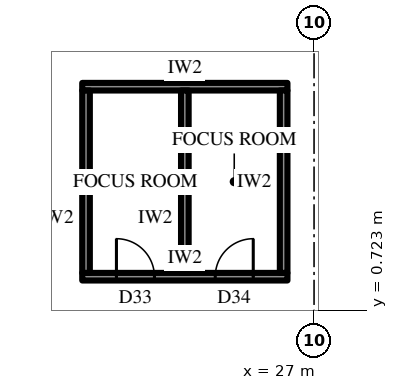
"""IFC4 building model, lengths in metres.
Left out: names, types, materials, properties, quantities, classifications, styles, units other than length and angle.
Written with IfcOpenShell. Run it as: python <this file> out.ifc"""

import sys

from ifc_helpers import new_model, si_unit, direction, frame, frame_2d, origin, place, context, subcontext, project, spatial, rectangle, extrude, element, fill, save


model = new_model("IFC4")
c1 = context("Model", 3, precision=1e-05, world=origin(), true_north=direction((0.0, 1.0)))
c2 = subcontext(c1, "Body", "Model", "MODEL_VIEW")
j1 = project(units=[si_unit("LENGTHUNIT", "METRE"), si_unit("PLANEANGLEUNIT", "RADIAN")], contexts=[c1])
p1 = place(None, origin())
s1 = spatial("IfcSite", under=j1, at=p1, CompositionType="ELEMENT")
p2 = place(p1, origin())
s2 = spatial("IfcBuilding", under=s1, at=p2, CompositionType="ELEMENT")
p3 = place(p2, frame((0.0, 0.0, 153.1)))
s3 = spatial("IfcBuildingStorey", under=s2, at=p3, CompositionType="ELEMENT", Elevation=153.1)
p4 = place(p3, frame((20.9, 1.6, 0.0), z_axis=(0.0, 0.0, 1.0), x_axis=(1.0, 0.0, 0.0)))
e1 = element("IfcWall", 1, at=p4, inside=s3, PredefinedType="PARTITIONING", context=c2, shape_type="SweptSolid", body=[
    extrude(rectangle(XDim=5.4, YDim=0.2, at=frame_2d((2.7, 0.0))), origin(), (0.0, 0.0, 1.0), 4.0),
])
p5 = place(p4, frame((0.9, 0.0, 0.0)))
e2 = element("IfcOpeningElement", 2, at=p5, cuts=e1, PredefinedType="OPENING", context=c2, shape_type="SweptSolid", body=[
    extrude(rectangle(XDim=1.0, YDim=2.2, at=frame_2d((0.5, 1.1))), frame((0.0, 0.11, 0.0), z_axis=(0.0, -1.0, 0.0), x_axis=(1.0, 0.0, 0.0)), (0.0, 0.0, 1.0), 0.22),
])
p6 = place(p4, frame((3.5, 0.0, 0.0)))
e3 = element("IfcOpeningElement", 3, at=p6, cuts=e1, PredefinedType="OPENING", context=c2, shape_type="SweptSolid", body=[
    extrude(rectangle(XDim=1.0, YDim=2.2, at=frame_2d((0.5, 1.1))), frame((0.0, 0.11, 0.0), z_axis=(0.0, -1.0, 0.0), x_axis=(1.0, 0.0, 0.0)), (0.0, 0.0, 1.0), 0.22),
])
p7 = place(p3, frame((20.9, 6.6, 0.0), z_axis=(0.0, 0.0, 1.0), x_axis=(1.0, 0.0, 0.0)))
e4 = element("IfcWall", 4, at=p7, inside=s3, PredefinedType="PARTITIONING", context=c2, shape_type="SweptSolid", body=[
    extrude(rectangle(XDim=5.4, YDim=0.2, at=frame_2d((2.7, 0.0))), origin(), (0.0, 0.0, 1.0), 4.0),
])
for number, where, z_axis, x_axis in (
    (5, (21.0, 1.7, 0.0), (0.0, 0.0, 1.0), (0.0, 1.0, 0.0)),
    (6, (23.6, 1.7, 0.0), (0.0, 0.0, 1.0), (0.0, 1.0, 0.0)),
    (7, (26.2, 1.7, 0.0), (0.0, 0.0, 1.0), (0.0, 1.0, 0.0)),
):
    element("IfcWall", number, at=place(p3, frame(where, z_axis=z_axis, x_axis=x_axis)), inside=s3, PredefinedType="PARTITIONING", context=c2, shape_type="SweptSolid", body=[
        extrude(rectangle(XDim=4.8, YDim=0.2, at=frame_2d((2.4, 0.0))), origin(), (0.0, 0.0, 1.0), 4.0),
    ])
p8 = place(p5, origin())
e8 = element("IfcDoor", 8, at=p8, inside=s3, OperationType="SINGLE_SWING_RIGHT", PredefinedType="DOOR", context=c2, shape_type="SweptSolid", body=[
    extrude(rectangle(XDim=1.0, YDim=2.2, at=frame_2d((0.5, 1.1))), frame((0.0, 0.025, 0.0), z_axis=(0.0, -1.0, 0.0), x_axis=(1.0, 0.0, 0.0)), (0.0, 0.0, 1.0), 0.05),
])
fill(e2, e8)
p9 = place(p6, origin())
e9 = element("IfcDoor", 9, at=p9, inside=s3, OperationType="SINGLE_SWING_LEFT", PredefinedType="DOOR", context=c2, shape_type="SweptSolid", body=[
    extrude(rectangle(XDim=1.0, YDim=2.2, at=frame_2d((0.5, 1.1))), frame((0.0, 0.025, 0.0), z_axis=(0.0, -1.0, 0.0), x_axis=(1.0, 0.0, 0.0)), (0.0, 0.0, 1.0), 0.05),
])
fill(e3, e9)
save(model, sys.argv[1])
